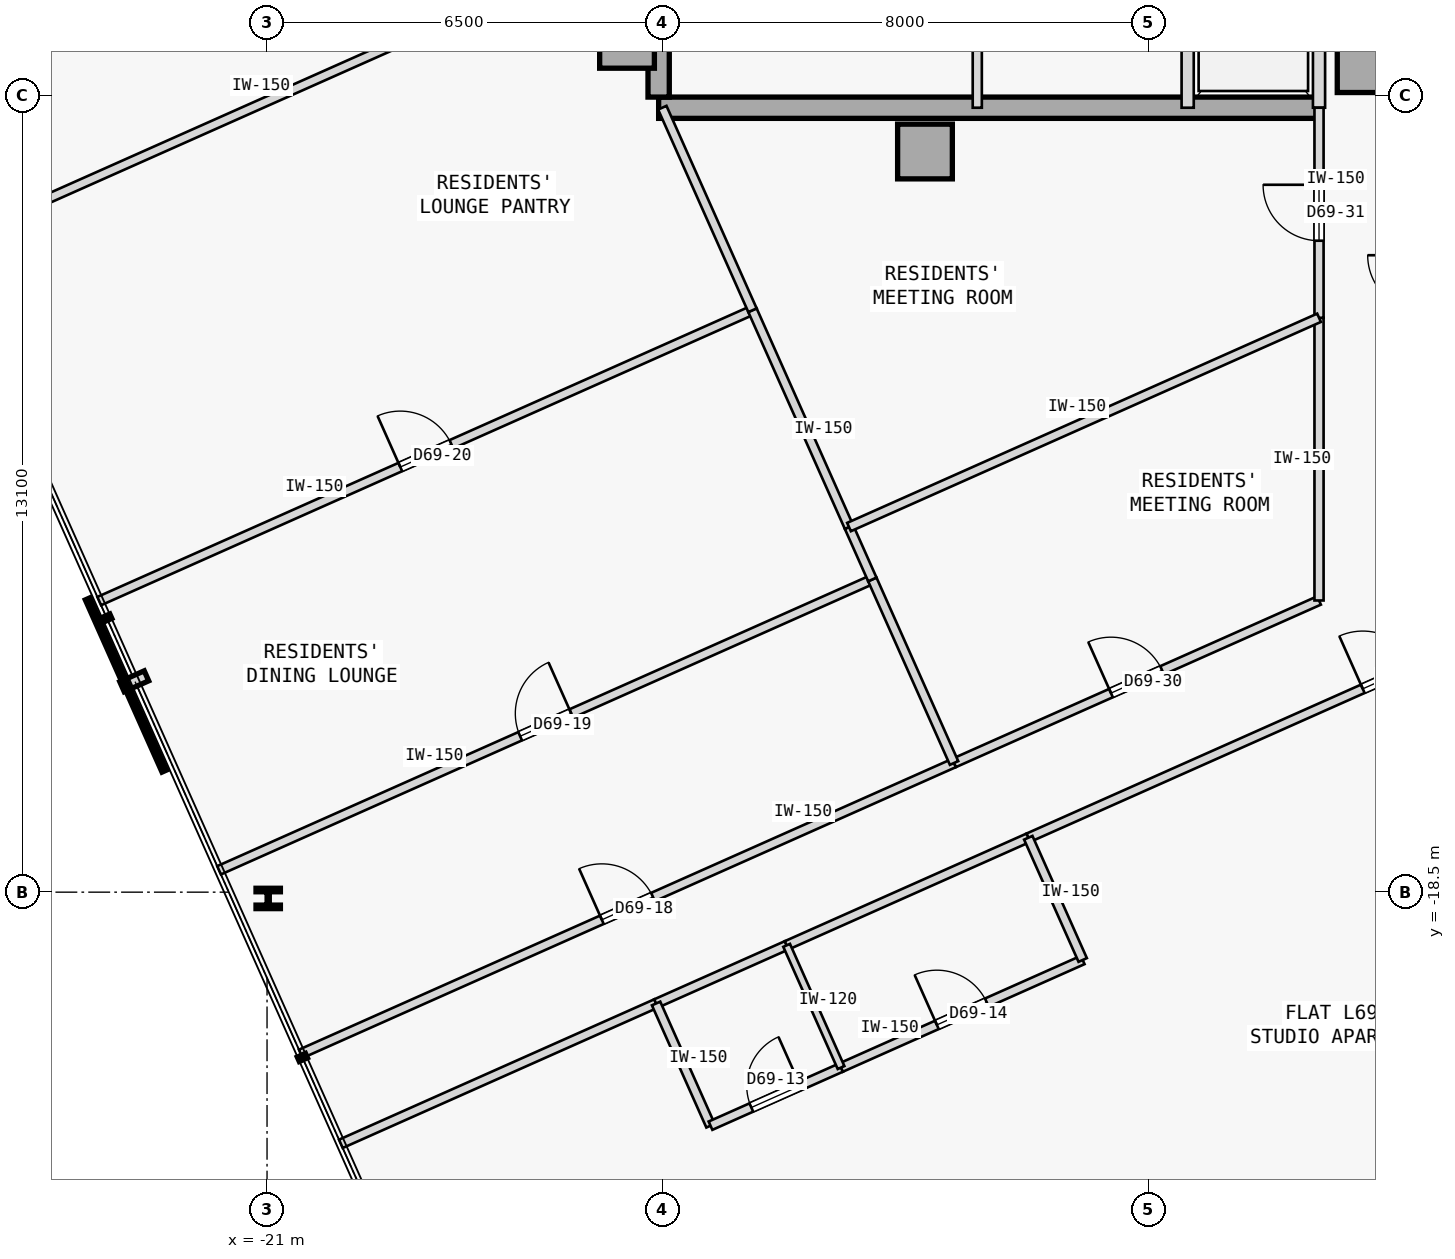
"""IFC4 building model, lengths in metres.
Left out: names, types, materials, properties, quantities, classifications, styles, units other than length and angle.
Written with IfcOpenShell. Run it as: python <this file> out.ifc"""

import sys

from ifc_helpers import new_model, si_unit, direction, frame, frame_2d, origin, origin_2d, place, context, subcontext, project, spatial, rectangle, i_section, extrude, element, fill, save


model = new_model("IFC4")
c1 = context("Model", 3, precision=1e-05, world=origin(), true_north=direction((0.0, 1.0)))
c2 = subcontext(c1, "Body", "Model", "MODEL_VIEW")
j1 = project(units=[si_unit("LENGTHUNIT", "METRE"), si_unit("PLANEANGLEUNIT", "RADIAN")], contexts=[c1])
p1 = place(None, origin())
s1 = spatial("IfcSite", under=j1, at=p1, CompositionType="ELEMENT")
p2 = place(p1, origin())
s2 = spatial("IfcBuilding", under=s1, at=p2, CompositionType="ELEMENT")
p3 = place(p2, frame((0.0, 0.0, 258.85)))
s3 = spatial("IfcBuildingStorey", under=s2, at=p3, CompositionType="ELEMENT", Elevation=258.85)
for number, where, z_axis, x_axis in (
    (1, (-15.08, -4.5, 0.0), (0.0, 0.0, 1.0), (1.0, 0.0, 0.0)),
    (2, (-10.18, -6.32, 0.0), (0.0, 0.0, 1.0), (1.0, 0.0, 0.0)),
    (3, (-2.95, -4.9, 0.0), (0.0, 0.0, 1.0), (1.0, 0.0, 0.0)),
):
    element("IfcColumn", number, at=place(p3, frame(where, z_axis=z_axis, x_axis=x_axis)), inside=s3, PredefinedType="COLUMN", context=c2, shape_type="SweptSolid", body=[
        extrude(rectangle(XDim=0.9, YDim=0.9, at=origin_2d()), origin(), (0.0, 0.0, 1.0), 3.35),
    ])
p4 = place(p3, frame((-14.56, -5.6, 0.0), z_axis=(0.0, 0.0, 1.0), x_axis=(1.0, 0.0, 0.0)))
e4 = element("IfcWall", 4, at=p4, inside=s3, PredefinedType="SHEAR", context=c2, shape_type="SweptSolid", body=[
    extrude(rectangle(XDim=10.86, YDim=0.35, at=frame_2d((5.43, 0.0))), origin(), (0.0, 0.0, 1.0), 3.125),
])
p5 = place(p3, frame((-14.56, -5.425, 0.0), z_axis=(0.0, 0.0, 1.0), x_axis=(0.0, 1.0, 0.0)))
e5 = element("IfcWall", 5, at=p5, inside=s3, PredefinedType="SHEAR", context=c2, shape_type="SweptSolid", body=[
    extrude(rectangle(XDim=10.85, YDim=0.35, at=frame_2d((5.425, 0.0))), origin(), (0.0, 0.0, 1.0), 3.125),
])
p6 = place(p3, frame((-20.981, -18.603, 0.0), z_axis=(0.0, 0.0, 1.0), x_axis=(1.0, 0.0, 0.0)))
e6 = element("IfcColumn", 6, at=p6, inside=s3, PredefinedType="COLUMN", context=c2, shape_type="SweptSolid", body=[
    extrude(i_section(OverallWidth=0.401, OverallDepth=0.335, WebThickness=0.036, FlangeThickness=0.058, FilletRadius=0.015, at=origin_2d()), origin(), (0.0, 0.0, 1.0), 3.35),
])
for number, where, z_axis, x_axis in (
    (7, (-3.7, -5.6, 0.0), (0.0, 0.0, 1.0), (0.0, 1.0, 0.0)),
    (8, (-5.86, -5.6, 0.0), (0.0, 0.0, 1.0), (0.0, 1.0, 0.0)),
):
    element("IfcWall", number, at=place(p3, frame(where, z_axis=z_axis, x_axis=x_axis)), inside=s3, PredefinedType="STANDARD", context=c2, shape_type="SweptSolid", body=[
        extrude(rectangle(XDim=2.65, YDim=0.2, at=frame_2d((1.325, 0.0))), origin(), (0.0, 0.0, 1.0), 3.125),
    ])
p7 = place(p3, frame((-9.32, -5.6, 0.0), z_axis=(0.0, 0.0, 1.0), x_axis=(0.0, 1.0, 0.0)))
e9 = element("IfcWall", 9, at=p7, inside=s3, PredefinedType="PARTITIONING", context=c2, shape_type="SweptSolid", body=[
    extrude(rectangle(XDim=2.65, YDim=0.15, at=frame_2d((1.325, 0.0))), origin(), (0.0, 0.0, 1.0), 3.125),
])
p8 = place(p3, frame((-19.786, -22.639, 0.0), z_axis=(0.0, 0.0, 1.0), x_axis=(0.913559465571, 0.406705179295, 0.0)))
e10 = element("IfcWall", 10, at=p8, inside=s3, PredefinedType="PARTITIONING", context=c2, shape_type="SweptSolid", body=[
    extrude(rectangle(XDim=5.675, YDim=0.15, at=frame_2d((2.837, 0.0))), origin(), (0.0, 0.0, 1.0), 3.125),
])
p9 = place(p3, frame((-8.481, -17.605, 0.0), z_axis=(0.0, 0.0, 1.0), x_axis=(0.913546352883, 0.406734632328, 0.0)))
e11 = element("IfcWall", 11, at=p9, inside=s3, PredefinedType="PARTITIONING", context=c2, shape_type="SweptSolid", body=[
    extrude(rectangle(XDim=12.993, YDim=0.15, at=frame_2d((6.497, 0.0))), origin(), (0.0, 0.0, 1.0), 3.125),
])
p10 = place(p9, frame((6.021, 0.0, 0.0)))
e12 = element("IfcOpeningElement", 12, at=p10, cuts=e11, PredefinedType="OPENING", context=c2, shape_type="SweptSolid", body=[
    extrude(rectangle(XDim=0.95, YDim=2.15, at=frame_2d((0.475, 1.075))), frame((0.0, 0.085, 0.0), z_axis=(0.0, -1.0, 0.0), x_axis=(1.0, 0.0, 0.0)), (0.0, 0.0, 1.0), 0.17),
])
p11 = place(p3, frame((-14.602, -20.331, 0.0), z_axis=(0.0, 0.0, 1.0), x_axis=(0.913502828817, 0.406832375486, 0.0)))
e13 = element("IfcWall", 13, at=p11, inside=s3, PredefinedType="PARTITIONING", context=c2, shape_type="SweptSolid", body=[
    extrude(rectangle(XDim=2.35, YDim=0.15, at=frame_2d((1.175, 0.0))), origin(), (0.0, 0.0, 1.0), 3.125),
])
p12 = place(p3, frame((-12.455, -19.375, 0.0), z_axis=(0.0, 0.0, 1.0), x_axis=(0.913545193015, 0.406737237438, 0.0)))
e14 = element("IfcWall", 14, at=p12, inside=s3, PredefinedType="PARTITIONING", context=c2, shape_type="SweptSolid", body=[
    extrude(rectangle(XDim=4.35, YDim=0.15, at=frame_2d((2.175, 0.0))), origin(), (0.0, 0.0, 1.0), 3.125),
])
p13 = place(p3, frame((-20.445, -21.159, 0.0), z_axis=(0.0, 0.0, 1.0), x_axis=(0.913547681516, 0.406731648137, 0.0)))
e15 = element("IfcWall", 15, at=p13, inside=s3, PredefinedType="PARTITIONING", context=c2, shape_type="SweptSolid", body=[
    extrude(rectangle(XDim=11.76, YDim=0.15, at=frame_2d((5.88, 0.0))), origin(), (0.0, 0.0, 1.0), 3.125),
])
p14 = place(p13, frame((5.42, 0.0, 0.0)))
e16 = element("IfcOpeningElement", 16, at=p14, cuts=e15, PredefinedType="OPENING", context=c2, shape_type="SweptSolid", body=[
    extrude(rectangle(XDim=0.92, YDim=2.15, at=frame_2d((0.46, 1.075))), frame((0.0, 0.085, 0.0), z_axis=(0.0, -1.0, 0.0), x_axis=(1.0, 0.0, 0.0)), (0.0, 0.0, 1.0), 0.17),
])
p15 = place(p3, frame((-9.702, -16.375, 0.0), z_axis=(0.0, 0.0, 1.0), x_axis=(0.913552389019, 0.406721074594, 0.0)))
e17 = element("IfcWall", 17, at=p15, inside=s3, PredefinedType="PARTITIONING", context=c2, shape_type="SweptSolid", body=[
    extrude(rectangle(XDim=6.57, YDim=0.15, at=frame_2d((3.285, 0.0))), origin(), (0.0, 0.0, 1.0), 3.125),
])
p16 = place(p15, frame((2.825, 0.0, 0.0)))
e18 = element("IfcOpeningElement", 18, at=p16, cuts=e17, PredefinedType="OPENING", context=c2, shape_type="SweptSolid", body=[
    extrude(rectangle(XDim=0.92, YDim=2.15, at=frame_2d((0.46, 1.075))), frame((0.0, 0.085, 0.0), z_axis=(0.0, -1.0, 0.0), x_axis=(1.0, 0.0, 0.0)), (0.0, 0.0, 1.0), 0.17),
])
p17 = place(p3, frame((-3.7, -13.703, 0.0), z_axis=(0.0, 0.0, 1.0), x_axis=(5.2512734e-05, 0.999999998621, 0.0)))
e19 = element("IfcWall", 19, at=p17, inside=s3, PredefinedType="PARTITIONING", context=c2, shape_type="SweptSolid", body=[
    extrude(rectangle(XDim=4.649, YDim=0.15, at=frame_2d((2.325, 0.0))), origin(), (0.0, 0.0, 1.0), 3.125),
])
p18 = place(p3, frame((-3.7, -9.054, 0.0), z_axis=(0.0, 0.0, 1.0), x_axis=(-7.0671378e-05, 0.999999997503, 0.0)))
e20 = element("IfcWall", 20, at=p18, inside=s3, PredefinedType="PARTITIONING", context=c2, shape_type="SweptSolid", body=[
    extrude(rectangle(XDim=3.455, YDim=0.15, at=frame_2d((1.727, 0.0))), origin(), (0.0, 0.0, 1.0), 3.125),
])
p19 = place(p18, frame((1.267, 0.0, 0.0)))
e21 = element("IfcOpeningElement", 21, at=p19, cuts=e20, PredefinedType="OPENING", context=c2, shape_type="SweptSolid", body=[
    extrude(rectangle(XDim=0.92, YDim=2.15, at=frame_2d((0.46, 1.075))), frame((0.0, 0.085, 0.0), z_axis=(0.0, -1.0, 0.0), x_axis=(1.0, 0.0, 0.0)), (0.0, 0.0, 1.0), 0.17),
])
p20 = place(p3, frame((-13.707, -22.34, 0.0), z_axis=(0.0, 0.0, 1.0), x_axis=(-0.406725294076, 0.913550510459, 0.0)))
e22 = element("IfcWall", 22, at=p20, inside=s3, PredefinedType="PARTITIONING", context=c2, shape_type="SweptSolid", body=[
    extrude(rectangle(XDim=2.2, YDim=0.15, at=frame_2d((1.1, 0.0))), origin(), (0.0, 0.0, 1.0), 3.125),
])
p21 = place(p3, frame((-13.707, -22.34, 0.0), z_axis=(0.0, 0.0, 1.0), x_axis=(0.913541436194, 0.406745675276, 0.0)))
e23 = element("IfcWall", 23, at=p21, inside=s3, PredefinedType="PARTITIONING", context=c2, shape_type="SweptSolid", body=[
    extrude(rectangle(XDim=2.35, YDim=0.15, at=frame_2d((1.175, 0.0))), origin(), (0.0, 0.0, 1.0), 3.125),
])
p22 = place(p21, frame((0.735, 0.0, 0.0)))
e24 = element("IfcOpeningElement", 24, at=p22, cuts=e23, PredefinedType="OPENING", context=c2, shape_type="SweptSolid", body=[
    extrude(rectangle(XDim=0.88, YDim=2.15, at=frame_2d((0.44, 1.075))), frame((0.0, 0.085, 0.0), z_axis=(0.0, -1.0, 0.0), x_axis=(1.0, 0.0, 0.0)), (0.0, 0.0, 1.0), 0.17),
])
p23 = place(p3, frame((-11.56, -21.385, 0.0), z_axis=(0.0, 0.0, 1.0), x_axis=(0.913533624044, 0.406763220732, 0.0)))
e25 = element("IfcWall", 25, at=p23, inside=s3, PredefinedType="PARTITIONING", context=c2, shape_type="SweptSolid", body=[
    extrude(rectangle(XDim=4.35, YDim=0.15, at=frame_2d((2.175, 0.0))), origin(), (0.0, 0.0, 1.0), 3.125),
])
p24 = place(p23, frame((1.725, 0.0, 0.0)))
e26 = element("IfcOpeningElement", 26, at=p24, cuts=e25, PredefinedType="OPENING", context=c2, shape_type="SweptSolid", body=[
    extrude(rectangle(XDim=0.9, YDim=2.15, at=frame_2d((0.45, 1.075))), frame((0.0, 0.085, 0.0), z_axis=(0.0, -1.0, 0.0), x_axis=(1.0, 0.0, 0.0)), (0.0, 0.0, 1.0), 0.17),
])
p25 = place(p3, frame((-7.586, -19.615, 0.0), z_axis=(0.0, 0.0, 1.0), x_axis=(-0.406817905151, 0.913509273105, 0.0)))
e27 = element("IfcWall", 27, at=p25, inside=s3, PredefinedType="PARTITIONING", context=c2, shape_type="SweptSolid", body=[
    extrude(rectangle(XDim=2.2, YDim=0.15, at=frame_2d((1.1, 0.0))), origin(), (0.0, 0.0, 1.0), 3.125),
])
p26 = place(p3, frame((-11.56, -21.385, 0.0), z_axis=(0.0, 0.0, 1.0), x_axis=(-0.406684063321, 0.913568865845, 0.0)))
e28 = element("IfcWall", 28, at=p26, inside=s3, PredefinedType="PARTITIONING", context=c2, shape_type="SweptSolid", body=[
    extrude(rectangle(XDim=2.2, YDim=0.12, at=frame_2d((1.1, 0.0))), origin(), (0.0, 0.0, 1.0), 3.125),
])
p27 = place(p3, frame((-21.789, -18.14, 0.0), z_axis=(0.0, 0.0, 1.0), x_axis=(0.913544247064, 0.406739362069, 0.0)))
e29 = element("IfcWall", 29, at=p27, inside=s3, PredefinedType="PARTITIONING", context=c2, shape_type="SweptSolid", body=[
    extrude(rectangle(XDim=11.76, YDim=0.15, at=frame_2d((5.88, 0.0))), origin(), (0.0, 0.0, 1.0), 3.125),
])
p28 = place(p27, frame((5.42, 0.0, 0.0)))
e30 = element("IfcOpeningElement", 30, at=p28, cuts=e29, PredefinedType="OPENING", context=c2, shape_type="SweptSolid", body=[
    extrude(rectangle(XDim=0.92, YDim=2.15, at=frame_2d((0.46, 1.075))), frame((0.0, 0.085, 0.0), z_axis=(0.0, -1.0, 0.0), x_axis=(1.0, 0.0, 0.0)), (0.0, 0.0, 1.0), 0.17),
])
p29 = place(p3, frame((-9.702, -16.375, 0.0), z_axis=(0.0, 0.0, 1.0), x_axis=(-0.406775972158, 0.913527946193, 0.0)))
e31 = element("IfcWall", 31, at=p29, inside=s3, PredefinedType="PARTITIONING", context=c2, shape_type="SweptSolid", body=[
    extrude(rectangle(XDim=3.304, YDim=0.15, at=frame_2d((1.652, 0.0))), origin(), (0.0, 0.0, 1.0), 3.125),
])
p30 = place(p3, frame((-23.76, -13.713, 0.0), z_axis=(0.0, 0.0, 1.0), x_axis=(0.913544247064, 0.406739362069, 0.0)))
e32 = element("IfcWall", 32, at=p30, inside=s3, PredefinedType="PARTITIONING", context=c2, shape_type="SweptSolid", body=[
    extrude(rectangle(XDim=11.76, YDim=0.15, at=frame_2d((5.88, 0.0))), origin(), (0.0, 0.0, 1.0), 3.125),
])
p31 = place(p30, frame((5.42, 0.0, 0.0)))
e33 = element("IfcOpeningElement", 33, at=p31, cuts=e32, PredefinedType="OPENING", context=c2, shape_type="SweptSolid", body=[
    extrude(rectangle(XDim=0.92, YDim=2.15, at=frame_2d((0.46, 1.075))), frame((0.0, 0.085, 0.0), z_axis=(0.0, -1.0, 0.0), x_axis=(1.0, 0.0, 0.0)), (0.0, 0.0, 1.0), 0.17),
])
p32 = place(p3, frame((-11.046, -13.357, 0.0), z_axis=(0.0, 0.0, 1.0), x_axis=(-0.406474743084, 0.913662018054, 0.0)))
e34 = element("IfcWall", 34, at=p32, inside=s3, PredefinedType="PARTITIONING", context=c2, shape_type="SweptSolid", body=[
    extrude(rectangle(XDim=0.943, YDim=0.15, at=frame_2d((0.471, 0.0))), origin(), (0.0, 0.0, 1.0), 3.125),
])
p33 = place(p3, frame((-11.429, -12.496, 0.0), z_axis=(0.0, 0.0, 1.0), x_axis=(-0.406782597231, 0.91352499615, 0.0)))
e35 = element("IfcWall", 35, at=p33, inside=s3, PredefinedType="PARTITIONING", context=c2, shape_type="SweptSolid", body=[
    extrude(rectangle(XDim=3.903, YDim=0.15, at=frame_2d((1.951, 0.0))), origin(), (0.0, 0.0, 1.0), 3.125),
])
p34 = place(p3, frame((-26.358, -7.878, 0.0), z_axis=(0.0, 0.0, 1.0), x_axis=(0.913547681516, 0.406731648137, 0.0)))
e36 = element("IfcWall", 36, at=p34, inside=s3, PredefinedType="PARTITIONING", context=c2, shape_type="SweptSolid", body=[
    extrude(rectangle(XDim=11.76, YDim=0.15, at=frame_2d((5.88, 0.0))), origin(), (0.0, 0.0, 1.0), 3.125),
])
p35 = place(p3, frame((-13.017, -8.93, 0.0), z_axis=(0.0, 0.0, 1.0), x_axis=(-0.406722395322, 0.913551801018, 0.0)))
e37 = element("IfcWall", 37, at=p35, inside=s3, PredefinedType="PARTITIONING", context=c2, shape_type="SweptSolid", body=[
    extrude(rectangle(XDim=3.646, YDim=0.15, at=frame_2d((1.823, 0.0))), origin(), (0.0, 0.0, 1.0), 3.125),
])
p36 = place(p3, frame((-11.429, -12.496, 0.0), z_axis=(0.0, 0.0, 1.0), x_axis=(0.913544816238, 0.406738083692, 0.0)))
e38 = element("IfcWall", 38, at=p36, inside=s3, PredefinedType="PARTITIONING", context=c2, shape_type="SweptSolid", body=[
    extrude(rectangle(XDim=8.461, YDim=0.15, at=frame_2d((4.23, 0.0))), origin(), (0.0, 0.0, 1.0), 3.125),
])
p37 = place(p10, origin())
e39 = element("IfcDoor", 39, at=p37, inside=s3, OperationType="SINGLE_SWING_LEFT", PredefinedType="DOOR", context=c2, shape_type="SweptSolid", body=[
    extrude(rectangle(XDim=0.95, YDim=2.15, at=frame_2d((0.475, 1.075))), frame((0.0, 0.025, 0.0), z_axis=(0.0, -1.0, 0.0), x_axis=(1.0, 0.0, 0.0)), (0.0, 0.0, 1.0), 0.05),
])
fill(e12, e39)
p38 = place(p22, origin())
e40 = element("IfcDoor", 40, at=p38, inside=s3, OperationType="SINGLE_SWING_RIGHT", PredefinedType="DOOR", context=c2, shape_type="SweptSolid", body=[
    extrude(rectangle(XDim=0.88, YDim=2.15, at=frame_2d((0.44, 1.075))), frame((0.0, 0.025, 0.0), z_axis=(0.0, -1.0, 0.0), x_axis=(1.0, 0.0, 0.0)), (0.0, 0.0, 1.0), 0.05),
])
fill(e24, e40)
p39 = place(p24, origin())
e41 = element("IfcDoor", 41, at=p39, inside=s3, OperationType="SINGLE_SWING_LEFT", PredefinedType="DOOR", context=c2, shape_type="SweptSolid", body=[
    extrude(rectangle(XDim=0.9, YDim=2.15, at=frame_2d((0.45, 1.075))), frame((0.0, 0.025, 0.0), z_axis=(0.0, -1.0, 0.0), x_axis=(1.0, 0.0, 0.0)), (0.0, 0.0, 1.0), 0.05),
])
fill(e26, e41)
p40 = place(p14, origin())
e42 = element("IfcDoor", 42, at=p40, inside=s3, OperationType="SINGLE_SWING_LEFT", PredefinedType="DOOR", context=c2, shape_type="SweptSolid", body=[
    extrude(rectangle(XDim=0.92, YDim=2.15, at=frame_2d((0.46, 1.075))), frame((0.0, 0.025, 0.0), z_axis=(0.0, -1.0, 0.0), x_axis=(1.0, 0.0, 0.0)), (0.0, 0.0, 1.0), 0.05),
])
fill(e16, e42)
p41 = place(p28, origin())
e43 = element("IfcDoor", 43, at=p41, inside=s3, OperationType="SINGLE_SWING_RIGHT", PredefinedType="DOOR", context=c2, shape_type="SweptSolid", body=[
    extrude(rectangle(XDim=0.92, YDim=2.15, at=frame_2d((0.46, 1.075))), frame((0.0, 0.025, 0.0), z_axis=(0.0, -1.0, 0.0), x_axis=(1.0, 0.0, 0.0)), (0.0, 0.0, 1.0), 0.05),
])
fill(e30, e43)
p42 = place(p31, origin())
e44 = element("IfcDoor", 44, at=p42, inside=s3, OperationType="SINGLE_SWING_LEFT", PredefinedType="DOOR", context=c2, shape_type="SweptSolid", body=[
    extrude(rectangle(XDim=0.92, YDim=2.15, at=frame_2d((0.46, 1.075))), frame((0.0, 0.025, 0.0), z_axis=(0.0, -1.0, 0.0), x_axis=(1.0, 0.0, 0.0)), (0.0, 0.0, 1.0), 0.05),
])
fill(e33, e44)
p43 = place(p16, origin())
e45 = element("IfcDoor", 45, at=p43, inside=s3, OperationType="SINGLE_SWING_LEFT", PredefinedType="DOOR", context=c2, shape_type="SweptSolid", body=[
    extrude(rectangle(XDim=0.92, YDim=2.15, at=frame_2d((0.46, 1.075))), frame((0.0, 0.025, 0.0), z_axis=(0.0, -1.0, 0.0), x_axis=(1.0, 0.0, 0.0)), (0.0, 0.0, 1.0), 0.05),
])
fill(e18, e45)
p44 = place(p19, origin())
e46 = element("IfcDoor", 46, at=p44, inside=s3, OperationType="SINGLE_SWING_RIGHT", PredefinedType="DOOR", context=c2, shape_type="SweptSolid", body=[
    extrude(rectangle(XDim=0.92, YDim=2.15, at=frame_2d((0.46, 1.075))), frame((0.0, 0.025, 0.0), z_axis=(0.0, -1.0, 0.0), x_axis=(1.0, 0.0, 0.0)), (0.0, 0.0, 1.0), 0.05),
])
fill(e21, e46)
save(model, sys.argv[1])
